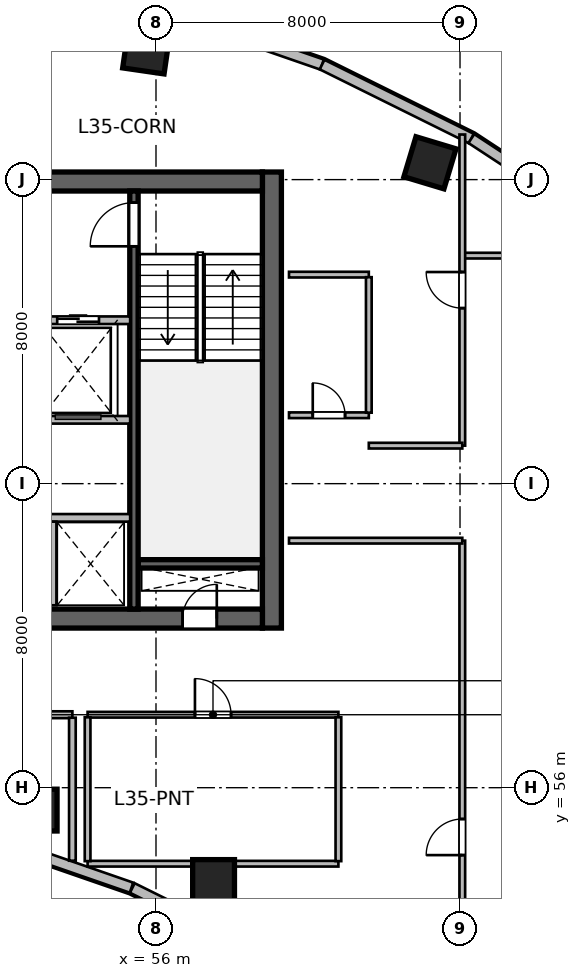
"""IFC4 building model, lengths in metres.
Left out: names, types, materials, properties, quantities, classifications, styles, units other than length and angle.
Written with IfcOpenShell. Run it as: python <this file> out.ifc"""

import sys

from ifc_helpers import new_model, si_unit, direction, frame, frame_2d, origin, origin_2d, place, context, subcontext, project, spatial, rectangle, circle, extrude, source, transform, mapped, element, fill, save


model = new_model("IFC4")
c1 = context("Model", 3, precision=1e-05, world=origin(), true_north=direction((0.0, 1.0)))
c2 = subcontext(c1, "Body", "Model", "MODEL_VIEW")
j1 = project(units=[si_unit("LENGTHUNIT", "METRE"), si_unit("PLANEANGLEUNIT", "RADIAN")], contexts=[c1])
p1 = place(None, origin())
s1 = spatial("IfcSite", under=j1, at=p1, CompositionType="ELEMENT")
p2 = place(p1, origin())
s2 = spatial("IfcBuilding", under=s1, at=p2, CompositionType="ELEMENT")
p3 = place(p2, frame((0.0, 0.0, 146.7)))
s3 = spatial("IfcBuildingStorey", under=s2, at=p3, CompositionType="ELEMENT", Elevation=146.7)
m1 = source(origin(), c2, "Body", "SweptSolid", [
    extrude(rectangle(XDim=12.0, YDim=0.5, at=frame_2d((6.0, 0.0))), origin(), (0.0, 0.0, 1.0), 3.9),
])
p4 = place(p3, frame((59.05, 60.2, 0.0), z_axis=(0.0, 0.0, 1.0), x_axis=(0.0, 1.0, 0.0)))
e1 = element("IfcWall", 1, at=p4, inside=s3, PredefinedType="SHEAR", context=c2, shape_type="MappedRepresentation", body=[
    mapped(m1, transform((0.0, 0.0, 0.0), scale=1.0)),
])
m2 = source(origin(), c2, "Body", "SweptSolid", [
    extrude(rectangle(XDim=21.6, YDim=0.5, at=frame_2d((10.8, 0.0))), origin(), (0.0, 0.0, 1.0), 3.9),
])
p5 = place(p3, frame((37.2, 60.45, 0.0), z_axis=(0.0, 0.0, 1.0), x_axis=(1.0, 0.0, 0.0)))
e2 = element("IfcWall", 2, at=p5, inside=s3, PredefinedType="SHEAR", context=c2, shape_type="MappedRepresentation", body=[
    mapped(m2, transform((0.0, 0.0, 0.0), scale=1.0)),
])
p6 = place(p5, frame((1.1, 0.0, 0.0)))
e3 = element("IfcOpeningElement", 3, at=p6, cuts=e2, PredefinedType="OPENING", context=c2, shape_type="SweptSolid", body=[
    extrude(rectangle(XDim=1.15, YDim=2.15, at=frame_2d((0.575, 1.075))), frame((0.0, 0.26, 0.0), z_axis=(0.0, -1.0, 0.0), x_axis=(1.0, 0.0, 0.0)), (0.0, 0.0, 1.0), 0.52),
])
p7 = place(p5, frame((19.5, 0.0, 0.0)))
e4 = element("IfcOpeningElement", 4, at=p7, cuts=e2, PredefinedType="OPENING", context=c2, shape_type="SweptSolid", body=[
    extrude(rectangle(XDim=0.9, YDim=2.1, at=frame_2d((0.45, 1.05))), frame((0.0, 0.26, 0.0), z_axis=(0.0, -1.0, 0.0), x_axis=(1.0, 0.0, 0.0)), (0.0, 0.0, 1.0), 0.52),
])
p8 = place(p5, frame((12.02, 0.0, 0.0)))
e5 = element("IfcOpeningElement", 5, at=p8, cuts=e2, PredefinedType="OPENING", context=c2, shape_type="SweptSolid", body=[
    extrude(rectangle(XDim=1.6, YDim=2.15, at=frame_2d((0.8, 1.075))), frame((0.0, 0.26, 0.0), z_axis=(0.0, -1.0, 0.0), x_axis=(1.0, 0.0, 0.0)), (0.0, 0.0, 1.0), 0.52),
])
p9 = place(p3, frame((37.2, 71.95, 0.0), z_axis=(0.0, 0.0, 1.0), x_axis=(1.0, 0.0, 0.0)))
e6 = element("IfcWall", 6, at=p9, inside=s3, PredefinedType="SHEAR", context=c2, shape_type="MappedRepresentation", body=[
    mapped(m2, transform((0.0, 0.0, 0.0), scale=1.0)),
])
p10 = place(p9, frame((1.2, 0.0, 0.0)))
e7 = element("IfcOpeningElement", 7, at=p10, cuts=e6, PredefinedType="OPENING", context=c2, shape_type="SweptSolid", body=[
    extrude(rectangle(XDim=0.9, YDim=2.1, at=frame_2d((0.45, 1.05))), frame((0.0, 0.26, 0.0), z_axis=(0.0, -1.0, 0.0), x_axis=(1.0, 0.0, 0.0)), (0.0, 0.0, 1.0), 0.52),
])
p11 = place(p9, frame((14.7, 0.0, 0.0)))
e8 = element("IfcOpeningElement", 8, at=p11, cuts=e6, PredefinedType="OPENING", context=c2, shape_type="SweptSolid", body=[
    extrude(rectangle(XDim=1.2, YDim=2.15, at=frame_2d((0.6, 1.075))), frame((0.0, 0.26, 0.0), z_axis=(0.0, -1.0, 0.0), x_axis=(1.0, 0.0, 0.0)), (0.0, 0.0, 1.0), 0.52),
])
p12 = place(p9, frame((4.15, 0.0, 0.0)))
e9 = element("IfcOpeningElement", 9, at=p12, cuts=e6, PredefinedType="OPENING", context=c2, shape_type="SweptSolid", body=[
    extrude(rectangle(XDim=1.3, YDim=2.15, at=frame_2d((0.65, 1.075))), frame((0.0, 0.26, 0.0), z_axis=(0.0, -1.0, 0.0), x_axis=(1.0, 0.0, 0.0)), (0.0, 0.0, 1.0), 0.52),
])
p13 = place(p9, frame((6.76, 0.0, 0.0)))
e10 = element("IfcOpeningElement", 10, at=p13, cuts=e6, PredefinedType="OPENING", context=c2, shape_type="SweptSolid", body=[
    extrude(rectangle(XDim=0.85, YDim=2.1, at=frame_2d((0.425, 1.05))), frame((0.0, 0.26, 0.0), z_axis=(0.0, -1.0, 0.0), x_axis=(1.0, 0.0, 0.0)), (0.0, 0.0, 1.0), 0.52),
])
p14 = place(p9, frame((8.76, 0.0, 0.0)))
e11 = element("IfcOpeningElement", 11, at=p14, cuts=e6, PredefinedType="OPENING", context=c2, shape_type="SweptSolid", body=[
    extrude(rectangle(XDim=0.85, YDim=2.1, at=frame_2d((0.425, 1.05))), frame((0.0, 0.26, 0.0), z_axis=(0.0, -1.0, 0.0), x_axis=(1.0, 0.0, 0.0)), (0.0, 0.0, 1.0), 0.52),
])
p15 = place(p9, frame((10.725, 0.0, 0.0)))
e12 = element("IfcOpeningElement", 12, at=p15, cuts=e6, PredefinedType="OPENING", context=c2, shape_type="SweptSolid", body=[
    extrude(rectangle(XDim=0.85, YDim=2.1, at=frame_2d((0.425, 1.05))), frame((0.0, 0.26, 0.0), z_axis=(0.0, -1.0, 0.0), x_axis=(1.0, 0.0, 0.0)), (0.0, 0.0, 1.0), 0.52),
])
m3 = source(origin(), c2, "Body", "SweptSolid", [
    extrude(rectangle(XDim=3.27, YDim=0.22, at=frame_2d((1.635, 0.0))), origin(), (0.0, 0.0, 1.0), 3.9),
])
p16 = place(p3, frame((55.53, 61.89, 0.0), z_axis=(0.0, 0.0, 1.0), x_axis=(1.0, 0.0, 0.0)))
e13 = element("IfcWall", 13, at=p16, inside=s3, PredefinedType="SHEAR", context=c2, shape_type="MappedRepresentation", body=[
    mapped(m3, transform((0.0, 0.0, 0.0), scale=1.0)),
])
m4 = source(origin(), c2, "Body", "SweptSolid", [
    extrude(rectangle(XDim=11.0, YDim=0.22, at=frame_2d((5.5, 0.0))), origin(), (0.0, 0.0, 1.0), 3.9),
])
p17 = place(p3, frame((55.42, 60.7, 0.0), z_axis=(0.0, 0.0, 1.0), x_axis=(0.0, 1.0, 0.0)))
e14 = element("IfcWall", 14, at=p17, inside=s3, PredefinedType="SHEAR", context=c2, shape_type="MappedRepresentation", body=[
    mapped(m4, transform((0.0, 0.0, 0.0), scale=1.0)),
])
p18 = place(p17, frame((9.545, 0.0, 0.0)))
e15 = element("IfcOpeningElement", 15, at=p18, cuts=e14, PredefinedType="OPENING", context=c2, shape_type="SweptSolid", body=[
    extrude(rectangle(XDim=1.15, YDim=2.15, at=frame_2d((0.575, 1.075))), frame((0.0, 0.12, 0.0), z_axis=(0.0, -1.0, 0.0), x_axis=(1.0, 0.0, 0.0)), (0.0, 0.0, 1.0), 0.24),
])
m5 = source(origin(), c2, "Body", "SweptSolid", [
    extrude(circle(Radius=0.55, at=origin_2d()), origin(), (0.0, 0.0, 1.0), 3.9),
])
p19 = place(p3, frame((52.846, 55.411, 0.0), z_axis=(0.0, 0.0, 1.0), x_axis=(0.143492621991, 0.98965138682, 0.0)))
e16 = element("IfcColumn", 16, at=p19, inside=s3, PredefinedType="COLUMN", context=c2, shape_type="MappedRepresentation", body=[
    mapped(m5, transform((0.0, 0.0, 0.0), scale=1.0)),
])
m6 = source(origin(), c2, "Body", "SweptSolid", [
    extrude(rectangle(XDim=1.1, YDim=1.1, at=origin_2d()), origin(), (0.0, 0.0, 1.0), 3.9),
])
p20 = place(p3, frame((55.747, 75.404, 0.0), z_axis=(0.0, 0.0, 1.0), x_axis=(0.143492621991, 0.98965138682, 0.0)))
e17 = element("IfcColumn", 17, at=p20, inside=s3, PredefinedType="COLUMN", context=c2, shape_type="MappedRepresentation", body=[
    mapped(m6, transform((0.0, 0.0, 0.0), scale=1.0)),
])
p21 = place(p3, frame((57.515, 53.558, 0.0), z_axis=(0.0, 0.0, 1.0), x_axis=(0.288697611798, 0.957420330337, 0.0)))
e18 = element("IfcColumn", 18, at=p21, inside=s3, PredefinedType="COLUMN", context=c2, shape_type="MappedRepresentation", body=[
    mapped(m5, transform((0.0, 0.0, 0.0), scale=1.0)),
])
p22 = place(p3, frame((63.209, 72.442, 0.0), z_axis=(0.0, 0.0, 1.0), x_axis=(0.288697611798, 0.957420330337, 0.0)))
e19 = element("IfcColumn", 19, at=p22, inside=s3, PredefinedType="COLUMN", context=c2, shape_type="MappedRepresentation", body=[
    mapped(m6, transform((0.0, 0.0, 0.0), scale=1.0)),
])
m7 = source(origin(), c2, "Body", "SweptSolid", [
    extrude(rectangle(XDim=2.584, YDim=0.28, at=frame_2d((1.292, 0.0))), origin(), (0.0, 0.0, 1.0), 3.65),
])
p23 = place(p3, frame((57.692, 52.213, 0.0), z_axis=(0.0, 0.0, 1.0), x_axis=(-0.895989792847, 0.44407464588, 0.0)))
e20 = element("IfcWall", 20, at=p23, inside=s3, PredefinedType="SOLIDWALL", context=c2, shape_type="MappedRepresentation", body=[
    mapped(m7, transform((0.0, 0.0, 0.0), scale=1.0)),
])
m8 = source(origin(), c2, "Body", "SweptSolid", [
    extrude(rectangle(XDim=2.53, YDim=0.28, at=frame_2d((1.265, 0.0))), origin(), (0.0, 0.0, 1.0), 3.65),
])
p24 = place(p3, frame((55.355, 53.37, 0.0), z_axis=(0.0, 0.0, 1.0), x_axis=(-0.944872429646, 0.327438683872, 0.0)))
e21 = element("IfcWall", 21, at=p24, inside=s3, PredefinedType="SOLIDWALL", context=c2, shape_type="MappedRepresentation", body=[
    mapped(m8, transform((0.0, 0.0, 0.0), scale=1.0)),
])
m9 = source(origin(), c2, "Body", "SweptSolid", [
    extrude(rectangle(XDim=4.29, YDim=0.28, at=frame_2d((2.145, 0.0))), origin(), (0.0, 0.0, 1.0), 3.65),
])
p25 = place(p3, frame((56.317, 76.431, 0.0), z_axis=(0.0, 0.0, 1.0), x_axis=(0.944883859218, -0.3274057003, 0.0)))
e22 = element("IfcWall", 22, at=p25, inside=s3, PredefinedType="SOLIDWALL", context=c2, shape_type="MappedRepresentation", body=[
    mapped(m9, transform((0.0, 0.0, 0.0), scale=1.0)),
])
m10 = source(origin(), c2, "Body", "SweptSolid", [
    extrude(rectangle(XDim=4.384, YDim=0.28, at=frame_2d((2.192, 0.0))), origin(), (0.0, 0.0, 1.0), 3.65),
])
p26 = place(p3, frame((60.37, 75.027, 0.0), z_axis=(0.0, 0.0, 1.0), x_axis=(0.895969968053, -0.444114643248, 0.0)))
e23 = element("IfcWall", 23, at=p26, inside=s3, PredefinedType="SOLIDWALL", context=c2, shape_type="MappedRepresentation", body=[
    mapped(m10, transform((0.0, 0.0, 0.0), scale=1.0)),
])
m11 = source(origin(), c2, "Body", "SweptSolid", [
    extrude(rectangle(XDim=4.501, YDim=0.28, at=frame_2d((2.25, 0.0))), origin(), (0.0, 0.0, 1.0), 3.65),
])
p27 = place(p3, frame((64.298, 73.08, 0.0), z_axis=(0.0, 0.0, 1.0), x_axis=(0.835984920737, -0.548752414391, 0.0)))
e24 = element("IfcWall", 24, at=p27, inside=s3, PredefinedType="SOLIDWALL", context=c2, shape_type="MappedRepresentation", body=[
    mapped(m11, transform((0.0, 0.0, 0.0), scale=1.0)),
])
m12 = source(origin(), c2, "Body", "SweptSolid", [
    extrude(rectangle(XDim=5.62, YDim=0.2, at=frame_2d((2.81, 0.0))), origin(), (0.0, 0.0, 1.0), 3.65),
])
p28 = place(p3, frame((49.7, 68.3, 0.0), z_axis=(0.0, 0.0, 1.0), x_axis=(1.0, 0.0, 0.0)))
e25 = element("IfcWall", 25, at=p28, inside=s3, PredefinedType="SOLIDWALL", context=c2, shape_type="MappedRepresentation", body=[
    mapped(m12, transform((0.0, 0.0, 0.0), scale=1.0)),
])
p29 = place(p28, frame((1.6, 0.0, 0.0)))
e26 = element("IfcOpeningElement", 26, at=p29, cuts=e25, PredefinedType="OPENING", context=c2, shape_type="SweptSolid", body=[
    extrude(rectangle(XDim=1.1, YDim=2.15, at=frame_2d((0.55, 1.075))), frame((0.0, 0.11, 0.0), z_axis=(0.0, -1.0, 0.0), x_axis=(1.0, 0.0, 0.0)), (0.0, 0.0, 1.0), 0.22),
])
p30 = place(p28, frame((3.7, 0.0, 0.0)))
e27 = element("IfcOpeningElement", 27, at=p30, cuts=e25, PredefinedType="OPENING", context=c2, shape_type="SweptSolid", body=[
    extrude(rectangle(XDim=1.1, YDim=2.15, at=frame_2d((0.55, 1.075))), frame((0.0, 0.11, 0.0), z_axis=(0.0, -1.0, 0.0), x_axis=(1.0, 0.0, 0.0)), (0.0, 0.0, 1.0), 0.22),
])
p31 = place(p3, frame((49.7, 65.68, 0.0), z_axis=(0.0, 0.0, 1.0), x_axis=(1.0, 0.0, 0.0)))
e28 = element("IfcWall", 28, at=p31, inside=s3, PredefinedType="SOLIDWALL", context=c2, shape_type="MappedRepresentation", body=[
    mapped(m12, transform((0.0, 0.0, 0.0), scale=1.0)),
])
m13 = source(origin(), c2, "Body", "SweptSolid", [
    extrude(rectangle(XDim=4.1, YDim=0.2, at=frame_2d((2.05, 0.0))), origin(), (0.0, 0.0, 1.0), 3.65),
])
p32 = place(p3, frame((51.22, 63.1, 0.0), z_axis=(0.0, 0.0, 1.0), x_axis=(1.0, 0.0, 0.0)))
e29 = element("IfcWall", 29, at=p32, inside=s3, PredefinedType="SOLIDWALL", context=c2, shape_type="MappedRepresentation", body=[
    mapped(m13, transform((0.0, 0.0, 0.0), scale=1.0)),
])
m14 = source(origin(), c2, "Body", "SweptSolid", [
    extrude(rectangle(XDim=2.2, YDim=0.2, at=frame_2d((1.1, 0.0))), origin(), (0.0, 0.0, 1.0), 3.65),
])
p33 = place(p3, frame((53.28, 60.8, 0.0), z_axis=(0.0, 0.0, 1.0), x_axis=(0.0, 1.0, 0.0)))
e30 = element("IfcWall", 30, at=p33, inside=s3, PredefinedType="SOLIDWALL", context=c2, shape_type="MappedRepresentation", body=[
    mapped(m14, transform((0.0, 0.0, 0.0), scale=1.0)),
])
m15 = source(origin(), c2, "Body", "SweptSolid", [
    extrude(rectangle(XDim=2.1, YDim=0.15, at=frame_2d((1.05, 0.0))), origin(), (0.0, 0.0, 1.0), 3.65),
])
p34 = place(p3, frame((59.5, 65.8, 0.0), z_axis=(0.0, 0.0, 1.0), x_axis=(1.0, 0.0, 0.0)))
e31 = element("IfcWall", 31, at=p34, inside=s3, PredefinedType="PARTITIONING", context=c2, shape_type="MappedRepresentation", body=[
    mapped(m15, transform((0.0, 0.0, 0.0), scale=1.0)),
])
p35 = place(p34, frame((0.625, 0.0, 0.0)))
e32 = element("IfcOpeningElement", 32, at=p35, cuts=e31, PredefinedType="OPENING", context=c2, shape_type="SweptSolid", body=[
    extrude(rectangle(XDim=0.85, YDim=2.1, at=frame_2d((0.425, 1.05))), frame((0.0, 0.085, 0.0), z_axis=(0.0, -1.0, 0.0), x_axis=(1.0, 0.0, 0.0)), (0.0, 0.0, 1.0), 0.17),
])
p36 = place(p3, frame((59.5, 69.5, 0.0), z_axis=(0.0, 0.0, 1.0), x_axis=(1.0, 0.0, 0.0)))
e33 = element("IfcWall", 33, at=p36, inside=s3, PredefinedType="PARTITIONING", context=c2, shape_type="MappedRepresentation", body=[
    mapped(m15, transform((0.0, 0.0, 0.0), scale=1.0)),
])
m16 = source(origin(), c2, "Body", "SweptSolid", [
    extrude(rectangle(XDim=3.565, YDim=0.15, at=frame_2d((1.783, 0.0))), origin(), (0.0, 0.0, 1.0), 3.65),
])
p37 = place(p3, frame((61.6, 65.867, 0.0), z_axis=(0.0, 0.0, 1.0), x_axis=(0.0, 1.0, 0.0)))
e34 = element("IfcWall", 34, at=p37, inside=s3, PredefinedType="PARTITIONING", context=c2, shape_type="MappedRepresentation", body=[
    mapped(m16, transform((0.0, 0.0, 0.0), scale=1.0)),
])
m17 = source(origin(), c2, "Body", "SweptSolid", [
    extrude(rectangle(XDim=3.248, YDim=0.18, at=frame_2d((1.624, 0.0))), origin(), (0.0, 0.0, 1.0), 3.65),
])
p38 = place(p3, frame((50.552, 57.92, 0.0), z_axis=(0.0, 0.0, 1.0), x_axis=(1.0, 0.0, 0.0)))
e35 = element("IfcWall", 35, at=p38, inside=s3, PredefinedType="PLUMBINGWALL", context=c2, shape_type="MappedRepresentation", body=[
    mapped(m17, transform((0.0, 0.0, 0.0), scale=1.0)),
])
p39 = place(p38, frame((1.149, 0.0, 0.0)))
e36 = element("IfcOpeningElement", 36, at=p39, cuts=e35, PredefinedType="OPENING", context=c2, shape_type="SweptSolid", body=[
    extrude(rectangle(XDim=0.95, YDim=2.12, at=frame_2d((0.475, 1.06))), frame((0.0, 0.1, 0.0), z_axis=(0.0, -1.0, 0.0), x_axis=(1.0, 0.0, 0.0)), (0.0, 0.0, 1.0), 0.2),
])
m18 = source(origin(), c2, "Body", "SweptSolid", [
    extrude(rectangle(XDim=3.763, YDim=0.175, at=frame_2d((1.881, 0.0))), origin(), (0.0, 0.0, 1.0), 3.65),
])
p40 = place(p3, frame((53.8, 54.079, 0.0), z_axis=(0.0, 0.0, 1.0), x_axis=(0.0, 1.0, 0.0)))
e37 = element("IfcWall", 37, at=p40, inside=s3, PredefinedType="PARTITIONING", context=c2, shape_type="MappedRepresentation", body=[
    mapped(m18, transform((0.0, 0.0, 0.0), scale=1.0)),
])
m19 = source(origin(), c2, "Body", "SweptSolid", [
    extrude(rectangle(XDim=6.6, YDim=0.15, at=frame_2d((3.3, 0.0))), origin(), (0.0, 0.0, 1.0), 3.095),
])
p41 = place(p3, frame((54.2, 54.0, 0.0), z_axis=(0.0, 0.0, 1.0), x_axis=(1.0, 0.0, 0.0)))
e38 = element("IfcWall", 38, at=p41, inside=s3, PredefinedType="PARTITIONING", context=c2, shape_type="MappedRepresentation", body=[
    mapped(m19, transform((0.0, 0.0, 0.0), scale=1.0)),
])
m20 = source(origin(), c2, "Body", "SweptSolid", [
    extrude(rectangle(XDim=6.6, YDim=0.15, at=frame_2d((3.3, 0.0))), origin(), (0.0, 0.0, 1.0), 3.65),
])
p42 = place(p3, frame((54.2, 57.92, 0.0), z_axis=(0.0, 0.0, 1.0), x_axis=(1.0, 0.0, 0.0)))
e39 = element("IfcWall", 39, at=p42, inside=s3, PredefinedType="PARTITIONING", context=c2, shape_type="MappedRepresentation", body=[
    mapped(m20, transform((0.0, 0.0, 0.0), scale=1.0)),
])
p43 = place(p42, frame((2.825, 0.0, 0.0)))
e40 = element("IfcOpeningElement", 40, at=p43, cuts=e39, PredefinedType="OPENING", context=c2, shape_type="SweptSolid", body=[
    extrude(rectangle(XDim=0.95, YDim=2.1, at=frame_2d((0.475, 1.05))), frame((0.0, 0.085, 0.0), z_axis=(0.0, -1.0, 0.0), x_axis=(1.0, 0.0, 0.0)), (0.0, 0.0, 1.0), 0.17),
])
m21 = source(origin(), c2, "Body", "SweptSolid", [
    extrude(rectangle(XDim=3.785, YDim=0.15, at=frame_2d((1.893, 0.0))), origin(), (0.0, 0.0, 1.0), 3.65),
])
for number, where, z_axis, x_axis in (
    (41, (54.2, 54.067, 0.0), (0.0, 0.0, 1.0), (0.0, 1.0, 0.0)),
    (42, (60.8, 54.067, 0.0), (0.0, 0.0, 1.0), (0.0, 1.0, 0.0)),
):
    element("IfcWall", number, at=place(p3, frame(where, z_axis=z_axis, x_axis=x_axis)), inside=s3, PredefinedType="PARTITIONING", context=c2, shape_type="MappedRepresentation", body=[
        mapped(m21, transform((0.0, 0.0, 0.0), scale=1.0)),
    ])
m22 = source(origin(), c2, "Body", "SweptSolid", [
    extrude(rectangle(XDim=2.5, YDim=0.15, at=frame_2d((1.25, 0.0))), origin(), (0.0, 0.0, 1.0), 3.65),
])
p44 = place(p3, frame((64.1, 70.0, 0.0), z_axis=(0.0, 0.0, 1.0), x_axis=(1.0, 0.0, 0.0)))
e43 = element("IfcWall", 43, at=p44, inside=s3, PredefinedType="PARTITIONING", context=c2, shape_type="MappedRepresentation", body=[
    mapped(m22, transform((0.0, 0.0, 0.0), scale=1.0)),
])
m23 = source(origin(), c2, "Body", "SweptSolid", [
    extrude(rectangle(XDim=15.598, YDim=0.15, at=frame_2d((7.799, 0.0))), origin(), (0.0, 0.0, 1.0), 2.942),
])
p45 = place(p3, frame((64.06, 46.902, 0.0), z_axis=(0.0, 0.0, 1.0), x_axis=(0.0, 1.0, 0.0)))
e44 = element("IfcWall", 44, at=p45, inside=s3, PredefinedType="PARTITIONING", context=c2, shape_type="MappedRepresentation", body=[
    mapped(m23, transform((0.0, 0.0, 0.0), scale=1.0)),
])
p46 = place(p45, frame((7.324, 0.0, 0.0)))
e45 = element("IfcOpeningElement", 45, at=p46, cuts=e44, PredefinedType="OPENING", context=c2, shape_type="SweptSolid", body=[
    extrude(rectangle(XDim=0.95, YDim=2.1, at=frame_2d((0.475, 1.05))), frame((0.0, 0.085, 0.0), z_axis=(0.0, -1.0, 0.0), x_axis=(1.0, 0.0, 0.0)), (0.0, 0.0, 1.0), 0.17),
])
m24 = source(origin(), c2, "Body", "SweptSolid", [
    extrude(rectangle(XDim=4.56, YDim=0.15, at=frame_2d((2.28, 0.0))), origin(), (0.0, 0.0, 1.0), 3.65),
])
p47 = place(p3, frame((59.5, 62.5, 0.0), z_axis=(0.0, 0.0, 1.0), x_axis=(1.0, 0.0, 0.0)))
e46 = element("IfcWall", 46, at=p47, inside=s3, PredefinedType="PARTITIONING", context=c2, shape_type="MappedRepresentation", body=[
    mapped(m24, transform((0.0, 0.0, 0.0), scale=1.0)),
])
m25 = source(origin(), c2, "Body", "SweptSolid", [
    extrude(rectangle(XDim=8.187, YDim=0.15, at=frame_2d((4.093, 0.0))), origin(), (0.0, 0.0, 1.0), 3.65),
])
p48 = place(p3, frame((64.06, 65.0, 0.0), z_axis=(0.0, 0.0, 1.0), x_axis=(0.0, 1.0, 0.0)))
e47 = element("IfcWall", 47, at=p48, inside=s3, PredefinedType="PARTITIONING", context=c2, shape_type="MappedRepresentation", body=[
    mapped(m25, transform((0.0, 0.0, 0.0), scale=1.0)),
])
p49 = place(p48, frame((3.618, 0.0, 0.0)))
e48 = element("IfcOpeningElement", 48, at=p49, cuts=e47, PredefinedType="OPENING", context=c2, shape_type="SweptSolid", body=[
    extrude(rectangle(XDim=0.95, YDim=2.1, at=frame_2d((0.475, 1.05))), frame((0.0, 0.085, 0.0), z_axis=(0.0, -1.0, 0.0), x_axis=(1.0, 0.0, 0.0)), (0.0, 0.0, 1.0), 0.17),
])
m26 = source(origin(), c2, "Body", "SweptSolid", [
    extrude(rectangle(XDim=2.46, YDim=0.15, at=frame_2d((1.23, 0.0))), origin(), (0.0, 0.0, 1.0), 3.65),
])
p50 = place(p3, frame((61.6, 65.0, 0.0), z_axis=(0.0, 0.0, 1.0), x_axis=(1.0, 0.0, 0.0)))
e49 = element("IfcWall", 49, at=p50, inside=s3, PredefinedType="PARTITIONING", context=c2, shape_type="MappedRepresentation", body=[
    mapped(m26, transform((0.0, 0.0, 0.0), scale=1.0)),
])
m27 = source(origin(), c2, "Body", "SweptSolid", [
    extrude(rectangle(XDim=0.9, YDim=2.1, at=frame_2d((0.45, 1.05))), frame((0.0, 0.025, 0.0), z_axis=(0.0, -1.0, 0.0), x_axis=(1.0, 0.0, 0.0)), (0.0, 0.0, 1.0), 0.05),
])
p51 = place(p7, origin())
e50 = element("IfcDoor", 50, at=p51, inside=s3, OperationType="SINGLE_SWING_RIGHT", PredefinedType="DOOR", context=c2, shape_type="MappedRepresentation", body=[
    mapped(m27, transform((0.0, 0.0, 0.0), scale=1.0)),
])
fill(e4, e50)
m28 = source(origin(), c2, "Body", "SweptSolid", [
    extrude(rectangle(XDim=1.15, YDim=2.15, at=frame_2d((0.575, 1.075))), frame((0.0, 0.025, 0.0), z_axis=(0.0, -1.0, 0.0), x_axis=(1.0, 0.0, 0.0)), (0.0, 0.0, 1.0), 0.05),
])
p52 = place(p18, origin())
e51 = element("IfcDoor", 51, at=p52, inside=s3, OperationType="SINGLE_SWING_LEFT", PredefinedType="DOOR", context=c2, shape_type="MappedRepresentation", body=[
    mapped(m28, transform((0.0, 0.0, 0.0), scale=1.0)),
])
fill(e15, e51)
m29 = source(origin(), c2, "Body", "SweptSolid", [
    extrude(rectangle(XDim=1.1, YDim=2.15, at=frame_2d((0.55, 1.075))), frame((0.0, 0.025, 0.0), z_axis=(0.0, -1.0, 0.0), x_axis=(1.0, 0.0, 0.0)), (0.0, 0.0, 1.0), 0.05),
])
p53 = place(p30, origin())
e52 = element("IfcDoor", 52, at=p53, inside=s3, OperationType="DOUBLE_DOOR_SLIDING", PredefinedType="DOOR", context=c2, shape_type="MappedRepresentation", body=[
    mapped(m29, transform((0.0, 0.0, 0.0), scale=1.0)),
])
fill(e27, e52)
m30 = source(origin(), c2, "Body", "SweptSolid", [
    extrude(rectangle(XDim=0.85, YDim=2.1, at=frame_2d((0.425, 1.05))), frame((0.0, 0.025, 0.0), z_axis=(0.0, -1.0, 0.0), x_axis=(1.0, 0.0, 0.0)), (0.0, 0.0, 1.0), 0.05),
])
p54 = place(p35, origin())
e53 = element("IfcDoor", 53, at=p54, inside=s3, OperationType="SINGLE_SWING_LEFT", PredefinedType="DOOR", context=c2, shape_type="MappedRepresentation", body=[
    mapped(m30, transform((0.0, 0.0, 0.0), scale=1.0)),
])
fill(e32, e53)
m31 = source(origin(), c2, "Body", "SweptSolid", [
    extrude(rectangle(XDim=0.95, YDim=2.1, at=frame_2d((0.475, 1.05))), frame((0.0, 0.025, 0.0), z_axis=(0.0, -1.0, 0.0), x_axis=(1.0, 0.0, 0.0)), (0.0, 0.0, 1.0), 0.05),
])
p55 = place(p43, origin())
e54 = element("IfcDoor", 54, at=p55, inside=s3, OperationType="SINGLE_SWING_LEFT", PredefinedType="DOOR", context=c2, shape_type="MappedRepresentation", body=[
    mapped(m31, transform((0.0, 0.0, 0.0), scale=1.0)),
])
fill(e40, e54)
p56 = place(p46, origin())
e55 = element("IfcDoor", 55, at=p56, inside=s3, OperationType="SINGLE_SWING_LEFT", PredefinedType="DOOR", context=c2, shape_type="MappedRepresentation", body=[
    mapped(m31, transform((0.0, 0.0, 0.0), scale=1.0)),
])
fill(e45, e55)
p57 = place(p49, origin())
e56 = element("IfcDoor", 56, at=p57, inside=s3, OperationType="SINGLE_SWING_RIGHT", PredefinedType="DOOR", context=c2, shape_type="MappedRepresentation", body=[
    mapped(m31, transform((0.0, 0.0, 0.0), scale=1.0)),
])
fill(e48, e56)
save(model, sys.argv[1])
